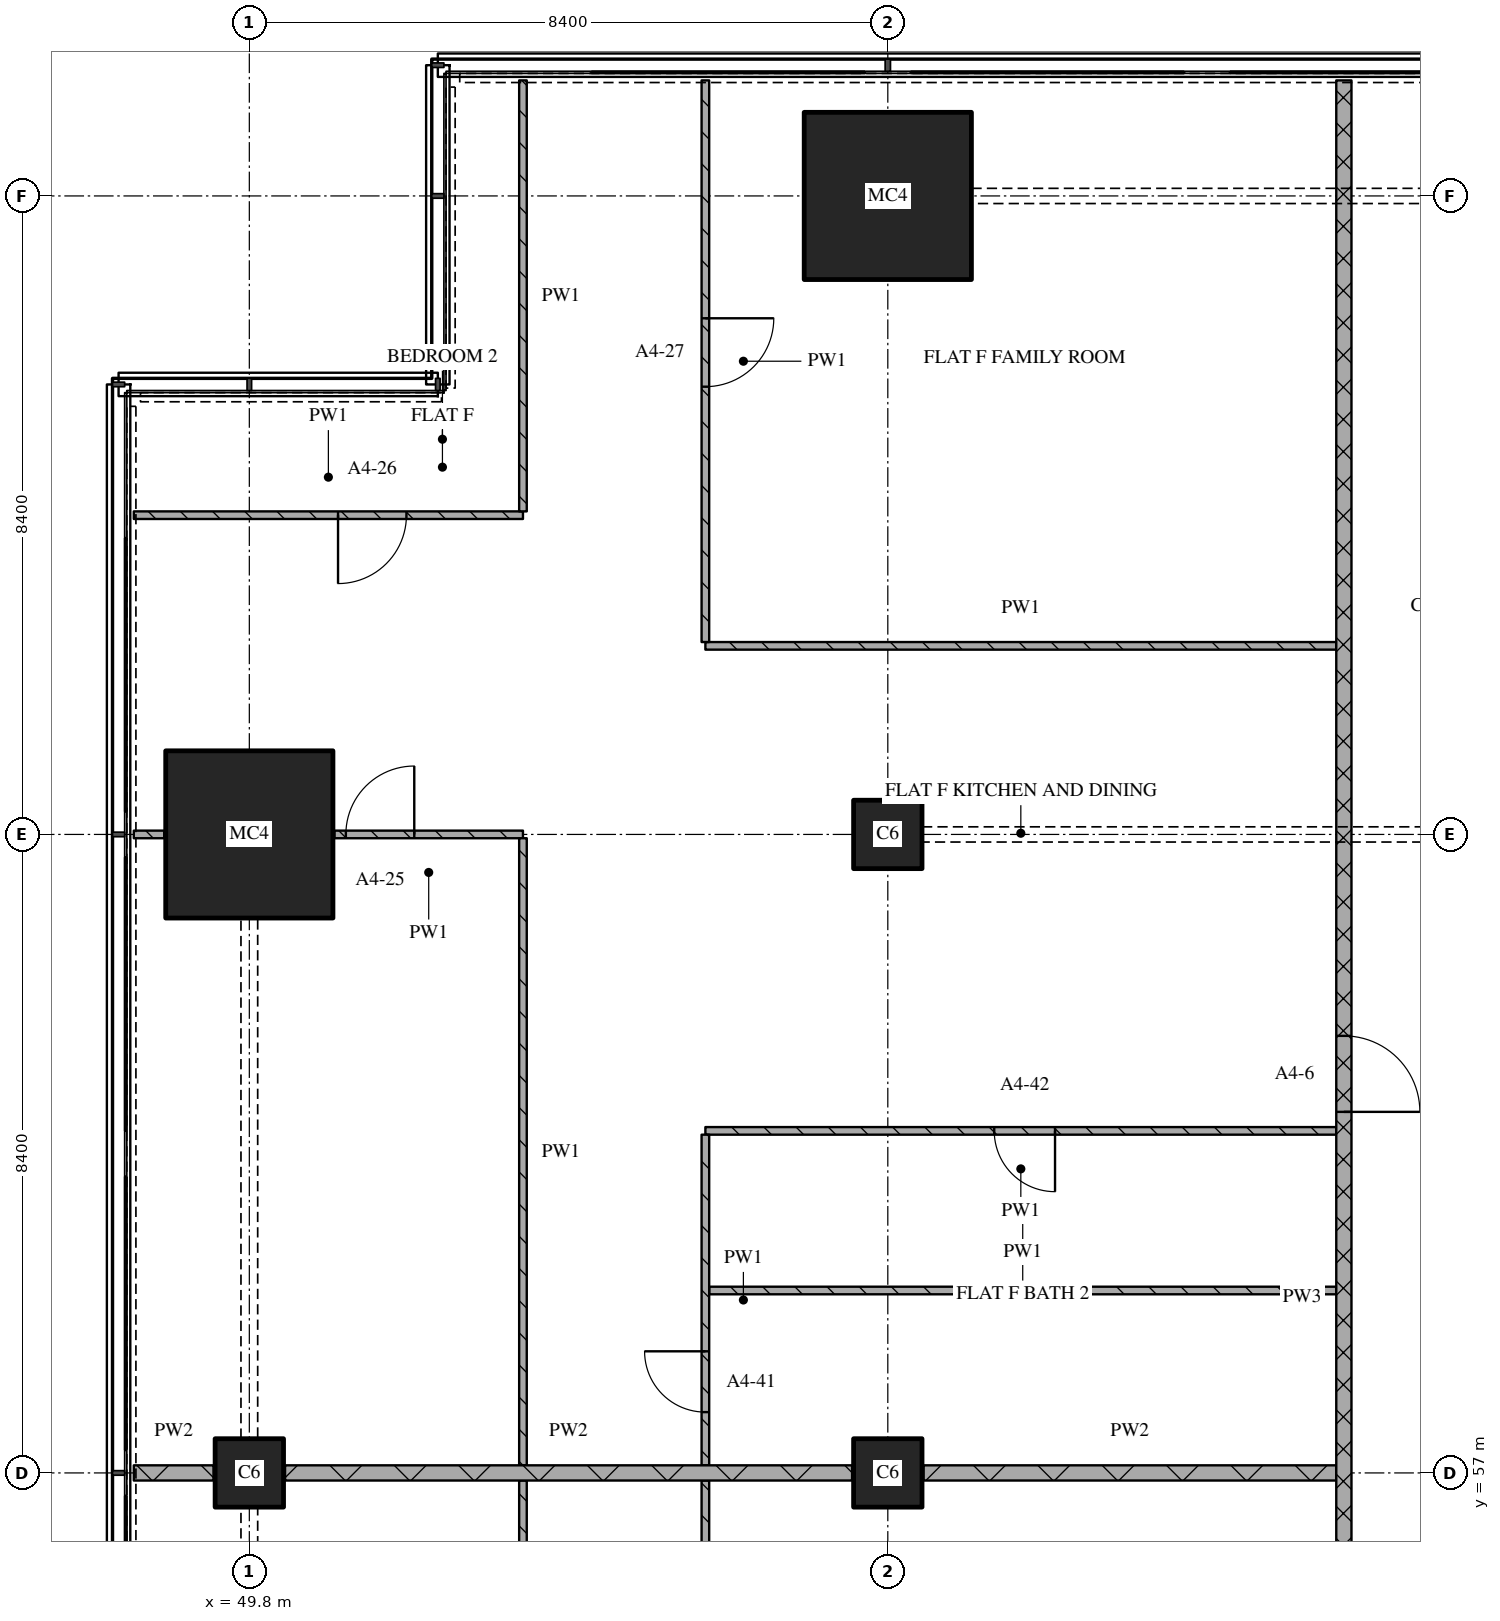
"""IFC4 building model, lengths in metres.
Left out: names, types, materials, properties, quantities, classifications, styles, units other than length and angle.
Written with IfcOpenShell. Run it as: python <this file> out.ifc"""

import sys

from ifc_helpers import new_model, si_unit, direction, frame, frame_2d, origin, origin_2d, place, context, subcontext, project, spatial, rectangle, extrude, element, fill, save


model = new_model("IFC4")
c1 = context("Model", 3, precision=1e-05, world=origin(), true_north=direction((0.0, 1.0)))
c2 = subcontext(c1, "Body", "Model", "MODEL_VIEW")
j1 = project(units=[si_unit("LENGTHUNIT", "METRE"), si_unit("PLANEANGLEUNIT", "RADIAN")], contexts=[c1])
p1 = place(None, origin())
s1 = spatial("IfcSite", under=j1, at=p1, CompositionType="ELEMENT")
p2 = place(p1, origin())
s2 = spatial("IfcBuilding", under=s1, at=p2, CompositionType="ELEMENT")
p3 = place(p2, frame((0.0, 0.0, 73.2)))
s3 = spatial("IfcBuildingStorey", under=s2, at=p3, CompositionType="ELEMENT", Elevation=73.2)
p4 = place(p3, frame((49.8, 57.0, 0.0), z_axis=(0.0, 0.0, 1.0), x_axis=(1.0, 0.0, 0.0)))
e1 = element("IfcColumn", 1, at=p4, inside=s3, PredefinedType="COLUMN", context=c2, shape_type="SweptSolid", body=[
    extrude(rectangle(XDim=0.9, YDim=0.9, at=origin_2d()), origin(), (0.0, 0.0, 1.0), 3.6),
])
p5 = place(p3, frame((49.8, 65.4, 0.0), z_axis=(0.0, 0.0, 1.0), x_axis=(1.0, 0.0, 0.0)))
e2 = element("IfcColumn", 2, at=p5, inside=s3, PredefinedType="COLUMN", context=c2, shape_type="SweptSolid", body=[
    extrude(rectangle(XDim=2.2, YDim=2.2, at=origin_2d()), origin(), (0.0, 0.0, 1.0), 3.6),
])
for number, where, z_axis, x_axis in (
    (3, (58.2, 57.0, 0.0), (0.0, 0.0, 1.0), (1.0, 0.0, 0.0)),
    (4, (58.2, 65.4, 0.0), (0.0, 0.0, 1.0), (1.0, 0.0, 0.0)),
):
    element("IfcColumn", number, at=place(p3, frame(where, z_axis=z_axis, x_axis=x_axis)), inside=s3, PredefinedType="COLUMN", context=c2, shape_type="SweptSolid", body=[
        extrude(rectangle(XDim=0.9, YDim=0.9, at=origin_2d()), origin(), (0.0, 0.0, 1.0), 3.6),
    ])
p6 = place(p3, frame((58.2, 73.8, 0.0), z_axis=(0.0, 0.0, 1.0), x_axis=(1.0, 0.0, 0.0)))
e5 = element("IfcColumn", 5, at=p6, inside=s3, PredefinedType="COLUMN", context=c2, shape_type="SweptSolid", body=[
    extrude(rectangle(XDim=2.2, YDim=2.2, at=origin_2d()), origin(), (0.0, 0.0, 1.0), 3.6),
])
p7 = place(p3, frame((48.28, 57.0, 0.0), z_axis=(0.0, 0.0, 1.0), x_axis=(1.0, 0.0, 0.0)))
e6 = element("IfcWall", 6, at=p7, inside=s3, PredefinedType="PARTITIONING", context=c2, shape_type="SweptSolid", body=[
    extrude(rectangle(XDim=1.05, YDim=0.2, at=frame_2d((0.525, 0.0))), origin(), (0.0, 0.0, 1.0), 3.32),
])
p8 = place(p3, frame((50.27, 57.0, 0.0), z_axis=(0.0, 0.0, 1.0), x_axis=(1.0, 0.0, 0.0)))
e7 = element("IfcWall", 7, at=p8, inside=s3, PredefinedType="PARTITIONING", context=c2, shape_type="SweptSolid", body=[
    extrude(rectangle(XDim=7.46, YDim=0.2, at=frame_2d((3.73, 0.0))), origin(), (0.0, 0.0, 1.0), 3.32),
])
p9 = place(p3, frame((58.67, 57.0, 0.0), z_axis=(0.0, 0.0, 1.0), x_axis=(1.0, 0.0, 0.0)))
e8 = element("IfcWall", 8, at=p9, inside=s3, PredefinedType="PARTITIONING", context=c2, shape_type="SweptSolid", body=[
    extrude(rectangle(XDim=5.43, YDim=0.2, at=frame_2d((2.715, 0.0))), origin(), (0.0, 0.0, 1.0), 3.32),
])
p10 = place(p3, frame((55.85, 59.4, 0.0), z_axis=(0.0, 0.0, 1.0), x_axis=(1.0, 0.0, 0.0)))
e9 = element("IfcWall", 9, at=p10, inside=s3, PredefinedType="PARTITIONING", context=c2, shape_type="SweptSolid", body=[
    extrude(rectangle(XDim=8.25, YDim=0.1, at=frame_2d((4.125, 0.0))), origin(), (0.0, 0.0, 1.0), 3.32),
])
p11 = place(p3, frame((64.1, 61.5, 0.0), z_axis=(0.0, 0.0, 1.0), x_axis=(-1.0, 0.0, 0.0)))
e10 = element("IfcWall", 10, at=p11, inside=s3, PredefinedType="PARTITIONING", context=c2, shape_type="SweptSolid", body=[
    extrude(rectangle(XDim=8.3, YDim=0.1, at=frame_2d((4.15, 0.0))), origin(), (0.0, 0.0, 1.0), 3.32),
])
p12 = place(p11, frame((3.7, 0.0, 0.0)))
e11 = element("IfcOpeningElement", 11, at=p12, cuts=e10, PredefinedType="OPENING", context=c2, shape_type="SweptSolid", body=[
    extrude(rectangle(XDim=0.8, YDim=2.1, at=frame_2d((0.4, 1.05))), frame((0.0, 0.06, 0.0), z_axis=(0.0, -1.0, 0.0), x_axis=(1.0, 0.0, 0.0)), (0.0, 0.0, 1.0), 0.12),
])
p13 = place(p3, frame((48.28, 65.4, 0.0), z_axis=(0.0, 0.0, 1.0), x_axis=(1.0, 0.0, 0.0)))
e12 = element("IfcWall", 12, at=p13, inside=s3, PredefinedType="PARTITIONING", context=c2, shape_type="SweptSolid", body=[
    extrude(rectangle(XDim=0.4, YDim=0.1, at=frame_2d((0.2, 0.0))), origin(), (0.0, 0.0, 1.0), 3.32),
])
p14 = place(p3, frame((53.4, 65.4, 0.0), z_axis=(0.0, 0.0, 1.0), x_axis=(-1.0, 0.0, 0.0)))
e13 = element("IfcWall", 13, at=p14, inside=s3, PredefinedType="PARTITIONING", context=c2, shape_type="SweptSolid", body=[
    extrude(rectangle(XDim=2.48, YDim=0.1, at=frame_2d((1.24, 0.0))), origin(), (0.0, 0.0, 1.0), 3.32),
])
p15 = place(p14, frame((1.43, 0.0, 0.0)))
e14 = element("IfcOpeningElement", 14, at=p15, cuts=e13, PredefinedType="OPENING", context=c2, shape_type="SweptSolid", body=[
    extrude(rectangle(XDim=0.9, YDim=2.1, at=frame_2d((0.45, 1.05))), frame((0.0, 0.06, 0.0), z_axis=(0.0, -1.0, 0.0), x_axis=(1.0, 0.0, 0.0)), (0.0, 0.0, 1.0), 0.12),
])
p16 = place(p3, frame((55.8, 67.881, 0.0), z_axis=(0.0, 0.0, 1.0), x_axis=(1.0, 0.0, 0.0)))
e15 = element("IfcWall", 15, at=p16, inside=s3, PredefinedType="PARTITIONING", context=c2, shape_type="SweptSolid", body=[
    extrude(rectangle(XDim=8.3, YDim=0.1, at=frame_2d((4.15, 0.0))), origin(), (0.0, 0.0, 1.0), 3.32),
])
p17 = place(p3, frame((48.28, 69.6, 0.0), z_axis=(0.0, 0.0, 1.0), x_axis=(1.0, 0.0, 0.0)))
e16 = element("IfcWall", 16, at=p17, inside=s3, PredefinedType="PARTITIONING", context=c2, shape_type="SweptSolid", body=[
    extrude(rectangle(XDim=5.12, YDim=0.1, at=frame_2d((2.56, 0.0))), origin(), (0.0, 0.0, 1.0), 3.32),
])
p18 = place(p17, frame((2.687, 0.0, 0.0)))
e17 = element("IfcOpeningElement", 17, at=p18, cuts=e16, PredefinedType="OPENING", context=c2, shape_type="SweptSolid", body=[
    extrude(rectangle(XDim=0.9, YDim=2.1, at=frame_2d((0.45, 1.05))), frame((0.0, 0.06, 0.0), z_axis=(0.0, -1.0, 0.0), x_axis=(1.0, 0.0, 0.0)), (0.0, 0.0, 1.0), 0.12),
])
p19 = place(p3, frame((53.4, 75.32, 0.0), z_axis=(0.0, 0.0, 1.0), x_axis=(0.0, -1.0, 0.0)))
e18 = element("IfcWall", 18, at=p19, inside=s3, PredefinedType="PARTITIONING", context=c2, shape_type="SweptSolid", body=[
    extrude(rectangle(XDim=5.67, YDim=0.1, at=frame_2d((2.835, 0.0))), origin(), (0.0, 0.0, 1.0), 3.32),
])
p20 = place(p3, frame((55.8, 75.32, 0.0), z_axis=(0.0, 0.0, 1.0), x_axis=(0.0, -1.0, 0.0)))
e19 = element("IfcWall", 19, at=p20, inside=s3, PredefinedType="PARTITIONING", context=c2, shape_type="SweptSolid", body=[
    extrude(rectangle(XDim=7.389, YDim=0.1, at=frame_2d((3.695, 0.0))), origin(), (0.0, 0.0, 1.0), 3.32),
])
p21 = place(p20, frame((3.129, 0.0, 0.0)))
e20 = element("IfcOpeningElement", 20, at=p21, cuts=e19, PredefinedType="OPENING", context=c2, shape_type="SweptSolid", body=[
    extrude(rectangle(XDim=0.9, YDim=2.1, at=frame_2d((0.45, 1.05))), frame((0.0, 0.06, 0.0), z_axis=(0.0, -1.0, 0.0), x_axis=(1.0, 0.0, 0.0)), (0.0, 0.0, 1.0), 0.12),
])
p22 = place(p3, frame((64.2, 43.3, 0.0), z_axis=(0.0, 0.0, 1.0), x_axis=(0.0, 1.0, 0.0)))
e21 = element("IfcWall", 21, at=p22, inside=s3, PredefinedType="PARTITIONING", context=c2, shape_type="SweptSolid", body=[
    extrude(rectangle(XDim=32.02, YDim=0.2, at=frame_2d((16.01, 0.0))), origin(), (0.0, 0.0, 1.0), 3.32),
])
p23 = place(p22, frame((9.15, 0.0, 0.0)))
e22 = element("IfcOpeningElement", 22, at=p23, cuts=e21, PredefinedType="OPENING", context=c2, shape_type="SweptSolid", body=[
    extrude(rectangle(XDim=1.0, YDim=2.1, at=frame_2d((0.5, 1.05))), frame((0.0, 0.11, 0.0), z_axis=(0.0, -1.0, 0.0), x_axis=(1.0, 0.0, 0.0)), (0.0, 0.0, 1.0), 0.22),
])
p24 = place(p22, frame((18.45, 0.0, 0.0)))
e23 = element("IfcOpeningElement", 23, at=p24, cuts=e21, PredefinedType="OPENING", context=c2, shape_type="SweptSolid", body=[
    extrude(rectangle(XDim=1.0, YDim=2.1, at=frame_2d((0.5, 1.05))), frame((0.0, 0.11, 0.0), z_axis=(0.0, -1.0, 0.0), x_axis=(1.0, 0.0, 0.0)), (0.0, 0.0, 1.0), 0.22),
])
for number, where, z_axis, x_axis in (
    (24, (53.4, 56.9, 0.0), (0.0, 0.0, 1.0), (0.0, -1.0, 0.0)),
    (25, (53.4, 65.35, 0.0), (0.0, 0.0, 1.0), (0.0, -1.0, 0.0)),
):
    element("IfcWall", number, at=place(p3, frame(where, z_axis=z_axis, x_axis=x_axis)), inside=s3, PredefinedType="PARTITIONING", context=c2, shape_type="SweptSolid", body=[
        extrude(rectangle(XDim=8.25, YDim=0.1, at=frame_2d((4.125, 0.0))), origin(), (0.0, 0.0, 1.0), 3.32),
    ])
p25 = place(p3, frame((55.8, 56.9, 0.0), z_axis=(0.0, 0.0, 1.0), x_axis=(0.0, -1.0, 0.0)))
e26 = element("IfcWall", 26, at=p25, inside=s3, PredefinedType="PARTITIONING", context=c2, shape_type="SweptSolid", body=[
    extrude(rectangle(XDim=3.15, YDim=0.1, at=frame_2d((1.575, 0.0))), origin(), (0.0, 0.0, 1.0), 3.32),
])
p26 = place(p3, frame((55.8, 61.45, 0.0), z_axis=(0.0, 0.0, 1.0), x_axis=(0.0, -1.0, 0.0)))
e27 = element("IfcWall", 27, at=p26, inside=s3, PredefinedType="PARTITIONING", context=c2, shape_type="SweptSolid", body=[
    extrude(rectangle(XDim=4.35, YDim=0.1, at=frame_2d((2.175, 0.0))), origin(), (0.0, 0.0, 1.0), 3.32),
])
p27 = place(p26, frame((2.85, 0.0, 0.0)))
e28 = element("IfcOpeningElement", 28, at=p27, cuts=e27, PredefinedType="OPENING", context=c2, shape_type="SweptSolid", body=[
    extrude(rectangle(XDim=0.8, YDim=2.1, at=frame_2d((0.4, 1.05))), frame((0.0, 0.06, 0.0), z_axis=(0.0, -1.0, 0.0), x_axis=(1.0, 0.0, 0.0)), (0.0, 0.0, 1.0), 0.12),
])
p28 = place(p12, origin())
e29 = element("IfcDoor", 29, at=p28, inside=s3, OperationType="SINGLE_SWING_LEFT", PredefinedType="DOOR", context=c2, shape_type="SweptSolid", body=[
    extrude(rectangle(XDim=0.8, YDim=2.1, at=frame_2d((0.4, 1.05))), frame((0.0, 0.025, 0.0), z_axis=(0.0, -1.0, 0.0), x_axis=(1.0, 0.0, 0.0)), (0.0, 0.0, 1.0), 0.05),
])
fill(e11, e29)
p29 = place(p15, origin())
e30 = element("IfcDoor", 30, at=p29, inside=s3, OperationType="SINGLE_SWING_RIGHT", PredefinedType="DOOR", context=c2, shape_type="SweptSolid", body=[
    extrude(rectangle(XDim=0.9, YDim=2.1, at=frame_2d((0.45, 1.05))), frame((0.0, 0.025, 0.0), z_axis=(0.0, -1.0, 0.0), x_axis=(1.0, 0.0, 0.0)), (0.0, 0.0, 1.0), 0.05),
])
fill(e14, e30)
p30 = place(p18, origin())
e31 = element("IfcDoor", 31, at=p30, inside=s3, OperationType="SINGLE_SWING_RIGHT", PredefinedType="DOOR", context=c2, shape_type="SweptSolid", body=[
    extrude(rectangle(XDim=0.9, YDim=2.1, at=frame_2d((0.45, 1.05))), frame((0.0, 0.025, 0.0), z_axis=(0.0, -1.0, 0.0), x_axis=(1.0, 0.0, 0.0)), (0.0, 0.0, 1.0), 0.05),
])
fill(e17, e31)
p31 = place(p21, origin())
e32 = element("IfcDoor", 32, at=p31, inside=s3, OperationType="SINGLE_SWING_LEFT", PredefinedType="DOOR", context=c2, shape_type="SweptSolid", body=[
    extrude(rectangle(XDim=0.9, YDim=2.1, at=frame_2d((0.45, 1.05))), frame((0.0, 0.025, 0.0), z_axis=(0.0, -1.0, 0.0), x_axis=(1.0, 0.0, 0.0)), (0.0, 0.0, 1.0), 0.05),
])
fill(e20, e32)
p32 = place(p24, origin())
e33 = element("IfcDoor", 33, at=p32, inside=s3, OperationType="SINGLE_SWING_RIGHT", PredefinedType="DOOR", context=c2, shape_type="SweptSolid", body=[
    extrude(rectangle(XDim=1.0, YDim=2.1, at=frame_2d((0.5, 1.05))), frame((0.0, 0.025, 0.0), z_axis=(0.0, -1.0, 0.0), x_axis=(1.0, 0.0, 0.0)), (0.0, 0.0, 1.0), 0.05),
])
fill(e23, e33)
p33 = place(p27, origin())
e34 = element("IfcDoor", 34, at=p33, inside=s3, OperationType="SINGLE_SWING_RIGHT", PredefinedType="DOOR", context=c2, shape_type="SweptSolid", body=[
    extrude(rectangle(XDim=0.8, YDim=2.1, at=frame_2d((0.4, 1.05))), frame((0.0, 0.025, 0.0), z_axis=(0.0, -1.0, 0.0), x_axis=(1.0, 0.0, 0.0)), (0.0, 0.0, 1.0), 0.05),
])
fill(e28, e34)
save(model, sys.argv[1])
